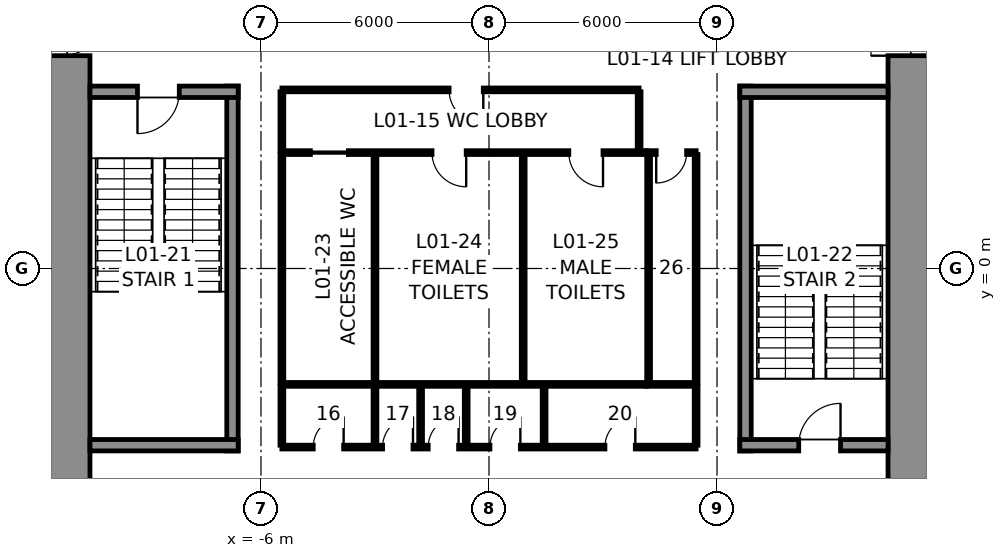
"""IFC4 building model, lengths in metres.
Left out: names, types, materials, properties, quantities, classifications, styles, units other than length and angle.
Written with IfcOpenShell. Run it as: python <this file> out.ifc"""

import sys

from ifc_helpers import new_model, si_unit, direction, frame, frame_2d, origin, place, context, subcontext, project, spatial, rectangle, extrude, element, fill, save


model = new_model("IFC4")
c1 = context("Model", 3, precision=1e-05, world=origin(), true_north=direction((0.0, 1.0)))
c2 = subcontext(c1, "Body", "Model", "MODEL_VIEW")
j1 = project(units=[si_unit("LENGTHUNIT", "METRE"), si_unit("PLANEANGLEUNIT", "RADIAN")], contexts=[c1])
p1 = place(None, origin())
s1 = spatial("IfcSite", under=j1, at=p1, CompositionType="ELEMENT")
p2 = place(p1, origin())
s2 = spatial("IfcBuilding", under=s1, at=p2, CompositionType="ELEMENT")
p3 = place(p2, frame((0.0, 0.0, 6.0)))
s3 = spatial("IfcBuildingStorey", under=s2, at=p3, CompositionType="ELEMENT", Elevation=6.0)
p4 = place(p3, frame((11.25, 10.5, 0.0), z_axis=(0.0, 0.0, 1.0), x_axis=(0.0, -1.0, 0.0)))
e1 = element("IfcWall", 1, at=p4, inside=s3, PredefinedType="SHEAR", context=c2, shape_type="SweptSolid", body=[
    extrude(rectangle(XDim=21.0, YDim=1.5, at=frame_2d((10.5, 0.0))), origin(), (0.0, 0.0, 1.0), 5.0),
])
p5 = place(p4, frame((3.7, 0.0, 0.0)))
e2 = element("IfcOpeningElement", 2, at=p5, cuts=e1, PredefinedType="OPENING", context=c2, shape_type="SweptSolid", body=[
    extrude(rectangle(XDim=1.2, YDim=2.3, at=frame_2d((0.6, 1.15))), frame((0.0, 0.76, 0.0), z_axis=(0.0, -1.0, 0.0), x_axis=(1.0, 0.0, 0.0)), (0.0, 0.0, 1.0), 1.52),
])
p6 = place(p4, frame((16.1, 0.0, 0.0)))
e3 = element("IfcOpeningElement", 3, at=p6, cuts=e1, PredefinedType="OPENING", context=c2, shape_type="SweptSolid", body=[
    extrude(rectangle(XDim=1.2, YDim=2.3, at=frame_2d((0.6, 1.15))), frame((0.0, 0.76, 0.0), z_axis=(0.0, -1.0, 0.0), x_axis=(1.0, 0.0, 0.0)), (0.0, 0.0, 1.0), 1.52),
])
p7 = place(p3, frame((-11.25, -10.5, 0.0), z_axis=(0.0, 0.0, 1.0), x_axis=(0.0, 1.0, 0.0)))
e4 = element("IfcWall", 4, at=p7, inside=s3, PredefinedType="SHEAR", context=c2, shape_type="SweptSolid", body=[
    extrude(rectangle(XDim=21.0, YDim=1.5, at=frame_2d((10.5, 0.0))), origin(), (0.0, 0.0, 1.0), 5.0),
])
p8 = place(p7, frame((16.1, 0.0, 0.0)))
e5 = element("IfcOpeningElement", 5, at=p8, cuts=e4, PredefinedType="OPENING", context=c2, shape_type="SweptSolid", body=[
    extrude(rectangle(XDim=1.2, YDim=2.3, at=frame_2d((0.6, 1.15))), frame((0.0, 0.76, 0.0), z_axis=(0.0, -1.0, 0.0), x_axis=(1.0, 0.0, 0.0)), (0.0, 0.0, 1.0), 1.52),
])
p9 = place(p7, frame((3.7, 0.0, 0.0)))
e6 = element("IfcOpeningElement", 6, at=p9, cuts=e4, PredefinedType="OPENING", context=c2, shape_type="SweptSolid", body=[
    extrude(rectangle(XDim=1.2, YDim=2.3, at=frame_2d((0.6, 1.15))), frame((0.0, 0.76, 0.0), z_axis=(0.0, -1.0, 0.0), x_axis=(1.0, 0.0, 0.0)), (0.0, 0.0, 1.0), 1.52),
])
p10 = place(p3, frame((-6.75, -4.8, 0.0), z_axis=(0.0, 0.0, 1.0), x_axis=(0.0, 1.0, 0.0)))
e7 = element("IfcWall", 7, at=p10, inside=s3, PredefinedType="SOLIDWALL", context=c2, shape_type="SweptSolid", body=[
    extrude(rectangle(XDim=9.6, YDim=0.3, at=frame_2d((4.8, 0.0))), origin(), (0.0, 0.0, 1.0), 4.75),
])
p11 = place(p3, frame((-10.5, 4.65, 0.0), z_axis=(0.0, 0.0, 1.0), x_axis=(1.0, 0.0, 0.0)))
e8 = element("IfcWall", 8, at=p11, inside=s3, PredefinedType="SOLIDWALL", context=c2, shape_type="SweptSolid", body=[
    extrude(rectangle(XDim=3.9, YDim=0.3, at=frame_2d((1.95, 0.0))), origin(), (0.0, 0.0, 1.0), 4.75),
])
p12 = place(p11, frame((1.25, 0.0, 0.0)))
e9 = element("IfcOpeningElement", 9, at=p12, cuts=e8, PredefinedType="OPENING", context=c2, shape_type="SweptSolid", body=[
    extrude(rectangle(XDim=1.1, YDim=2.3, at=frame_2d((0.55, 1.15))), frame((0.0, 0.16, 0.0), z_axis=(0.0, -1.0, 0.0), x_axis=(1.0, 0.0, 0.0)), (0.0, 0.0, 1.0), 0.32),
])
p13 = place(p3, frame((-6.6, -4.65, 0.0), z_axis=(0.0, 0.0, 1.0), x_axis=(-1.0, 0.0, 0.0)))
e10 = element("IfcWall", 10, at=p13, inside=s3, PredefinedType="SOLIDWALL", context=c2, shape_type="SweptSolid", body=[
    extrude(rectangle(XDim=3.9, YDim=0.3, at=frame_2d((1.95, 0.0))), origin(), (0.0, 0.0, 1.0), 4.75),
])
p14 = place(p3, frame((6.75, -4.8, 0.0), z_axis=(0.0, 0.0, 1.0), x_axis=(0.0, 1.0, 0.0)))
e11 = element("IfcWall", 11, at=p14, inside=s3, PredefinedType="SOLIDWALL", context=c2, shape_type="SweptSolid", body=[
    extrude(rectangle(XDim=9.6, YDim=0.3, at=frame_2d((4.8, 0.0))), origin(), (0.0, 0.0, 1.0), 4.75),
])
p15 = place(p3, frame((6.6, 4.65, 0.0), z_axis=(0.0, 0.0, 1.0), x_axis=(1.0, 0.0, 0.0)))
e12 = element("IfcWall", 12, at=p15, inside=s3, PredefinedType="SOLIDWALL", context=c2, shape_type="SweptSolid", body=[
    extrude(rectangle(XDim=3.9, YDim=0.3, at=frame_2d((1.95, 0.0))), origin(), (0.0, 0.0, 1.0), 4.75),
])
p16 = place(p3, frame((10.5, -4.65, 0.0), z_axis=(0.0, 0.0, 1.0), x_axis=(-1.0, 0.0, 0.0)))
e13 = element("IfcWall", 13, at=p16, inside=s3, PredefinedType="SOLIDWALL", context=c2, shape_type="SweptSolid", body=[
    extrude(rectangle(XDim=3.9, YDim=0.3, at=frame_2d((1.95, 0.0))), origin(), (0.0, 0.0, 1.0), 4.75),
])
p17 = place(p16, frame((1.25, 0.0, 0.0)))
e14 = element("IfcOpeningElement", 14, at=p17, cuts=e13, PredefinedType="OPENING", context=c2, shape_type="SweptSolid", body=[
    extrude(rectangle(XDim=1.1, YDim=2.3, at=frame_2d((0.55, 1.15))), frame((0.0, 0.16, 0.0), z_axis=(0.0, -1.0, 0.0), x_axis=(1.0, 0.0, 0.0)), (0.0, 0.0, 1.0), 0.32),
])
p18 = place(p3, frame((-5.45, 3.05, 0.0), z_axis=(0.0, 0.0, 1.0), x_axis=(1.0, 0.0, 0.0)))
e15 = element("IfcWall", 15, at=p18, inside=s3, PredefinedType="PARTITIONING", context=c2, shape_type="SweptSolid", body=[
    extrude(rectangle(XDim=9.6, YDim=0.1, at=frame_2d((4.8, 0.0))), origin(), (0.0, 0.0, 1.0), 4.75),
])
p19 = place(p18, frame((0.75, 0.0, 0.0)))
e16 = element("IfcOpeningElement", 16, at=p19, cuts=e15, PredefinedType="OPENING", context=c2, shape_type="SweptSolid", body=[
    extrude(rectangle(XDim=1.0, YDim=2.3, at=frame_2d((0.5, 1.15))), frame((0.0, 0.06, 0.0), z_axis=(0.0, -1.0, 0.0), x_axis=(1.0, 0.0, 0.0)), (0.0, 0.0, 1.0), 0.12),
])
p20 = place(p18, frame((3.95, 0.0, 0.0)))
e17 = element("IfcOpeningElement", 17, at=p20, cuts=e15, PredefinedType="OPENING", context=c2, shape_type="SweptSolid", body=[
    extrude(rectangle(XDim=0.9, YDim=2.3, at=frame_2d((0.45, 1.15))), frame((0.0, 0.06, 0.0), z_axis=(0.0, -1.0, 0.0), x_axis=(1.0, 0.0, 0.0)), (0.0, 0.0, 1.0), 0.12),
])
p21 = place(p18, frame((7.55, 0.0, 0.0)))
e18 = element("IfcOpeningElement", 18, at=p21, cuts=e15, PredefinedType="OPENING", context=c2, shape_type="SweptSolid", body=[
    extrude(rectangle(XDim=0.9, YDim=2.3, at=frame_2d((0.45, 1.15))), frame((0.0, 0.06, 0.0), z_axis=(0.0, -1.0, 0.0), x_axis=(1.0, 0.0, 0.0)), (0.0, 0.0, 1.0), 0.12),
])
p22 = place(p3, frame((4.15, 3.05, 0.0), z_axis=(0.0, 0.0, 1.0), x_axis=(1.0, 0.0, 0.0)))
e19 = element("IfcWall", 19, at=p22, inside=s3, PredefinedType="PARTITIONING", context=c2, shape_type="SweptSolid", body=[
    extrude(rectangle(XDim=1.3, YDim=0.1, at=frame_2d((0.65, 0.0))), origin(), (0.0, 0.0, 1.0), 4.75),
])
p23 = place(p22, frame((0.25, 0.0, 0.0)))
e20 = element("IfcOpeningElement", 20, at=p23, cuts=e19, PredefinedType="OPENING", context=c2, shape_type="SweptSolid", body=[
    extrude(rectangle(XDim=0.8, YDim=2.3, at=frame_2d((0.4, 1.15))), frame((0.0, 0.06, 0.0), z_axis=(0.0, -1.0, 0.0), x_axis=(1.0, 0.0, 0.0)), (0.0, 0.0, 1.0), 0.12),
])
p24 = place(p3, frame((4.15, -3.05, 0.0), z_axis=(0.0, 0.0, 1.0), x_axis=(-1.0, 0.0, 0.0)))
e21 = element("IfcWall", 21, at=p24, inside=s3, PredefinedType="PARTITIONING", context=c2, shape_type="SweptSolid", body=[
    extrude(rectangle(XDim=9.6, YDim=0.1, at=frame_2d((4.8, 0.0))), origin(), (0.0, 0.0, 1.0), 4.75),
])
p25 = place(p3, frame((5.45, -3.05, 0.0), z_axis=(0.0, 0.0, 1.0), x_axis=(-1.0, 0.0, 0.0)))
e22 = element("IfcWall", 22, at=p25, inside=s3, PredefinedType="PARTITIONING", context=c2, shape_type="SweptSolid", body=[
    extrude(rectangle(XDim=1.3, YDim=0.1, at=frame_2d((0.65, 0.0))), origin(), (0.0, 0.0, 1.0), 4.75),
])
for number, where, z_axis, x_axis in (
    (23, (5.45, 3.0, 0.0), (0.0, 0.0, 1.0), (0.0, -1.0, 0.0)),
    (24, (-5.45, -3.0, 0.0), (0.0, 0.0, 1.0), (0.0, 1.0, 0.0)),
    (25, (-3.0, -3.0, 0.0), (0.0, 0.0, 1.0), (0.0, 1.0, 0.0)),
    (26, (0.9, -3.0, 0.0), (0.0, 0.0, 1.0), (0.0, 1.0, 0.0)),
    (27, (4.2, -3.0, 0.0), (0.0, 0.0, 1.0), (0.0, 1.0, 0.0)),
):
    element("IfcWall", number, at=place(p3, frame(where, z_axis=z_axis, x_axis=x_axis)), inside=s3, PredefinedType="PARTITIONING", context=c2, shape_type="SweptSolid", body=[
        extrude(rectangle(XDim=6.0, YDim=0.1, at=frame_2d((3.0, 0.0))), origin(), (0.0, 0.0, 1.0), 4.75),
    ])
p26 = place(p3, frame((-5.45, 4.7, 0.0), z_axis=(0.0, 0.0, 1.0), x_axis=(1.0, 0.0, 0.0)))
e28 = element("IfcWall", 28, at=p26, inside=s3, PredefinedType="PARTITIONING", context=c2, shape_type="SweptSolid", body=[
    extrude(rectangle(XDim=9.4, YDim=0.1, at=frame_2d((4.7, 0.0))), origin(), (0.0, 0.0, 1.0), 4.75),
])
p27 = place(p26, frame((4.4, 0.0, 0.0)))
e29 = element("IfcOpeningElement", 29, at=p27, cuts=e28, PredefinedType="OPENING", context=c2, shape_type="SweptSolid", body=[
    extrude(rectangle(XDim=0.9, YDim=2.3, at=frame_2d((0.45, 1.15))), frame((0.0, 0.06, 0.0), z_axis=(0.0, -1.0, 0.0), x_axis=(1.0, 0.0, 0.0)), (0.0, 0.0, 1.0), 0.12),
])
for number, where, z_axis, x_axis in (
    (30, (-5.45, 3.1, 0.0), (0.0, 0.0, 1.0), (0.0, 1.0, 0.0)),
    (31, (3.95, 3.1, 0.0), (0.0, 0.0, 1.0), (0.0, 1.0, 0.0)),
):
    element("IfcWall", number, at=place(p3, frame(where, z_axis=z_axis, x_axis=x_axis)), inside=s3, PredefinedType="PARTITIONING", context=c2, shape_type="SweptSolid", body=[
        extrude(rectangle(XDim=1.55, YDim=0.1, at=frame_2d((0.775, 0.0))), origin(), (0.0, 0.0, 1.0), 4.75),
    ])
p28 = place(p3, frame((5.45, -4.7, 0.0), z_axis=(0.0, 0.0, 1.0), x_axis=(-1.0, 0.0, 0.0)))
e32 = element("IfcWall", 32, at=p28, inside=s3, PredefinedType="PARTITIONING", context=c2, shape_type="SweptSolid", body=[
    extrude(rectangle(XDim=10.9, YDim=0.1, at=frame_2d((5.45, 0.0))), origin(), (0.0, 0.0, 1.0), 4.75),
])
p29 = place(p28, frame((9.275, 0.0, 0.0)))
e33 = element("IfcOpeningElement", 33, at=p29, cuts=e32, PredefinedType="OPENING", context=c2, shape_type="SweptSolid", body=[
    extrude(rectangle(XDim=0.8, YDim=2.3, at=frame_2d((0.4, 1.15))), frame((0.0, 0.06, 0.0), z_axis=(0.0, -1.0, 0.0), x_axis=(1.0, 0.0, 0.0)), (0.0, 0.0, 1.0), 0.12),
])
p30 = place(p28, frame((7.45, 0.0, 0.0)))
e34 = element("IfcOpeningElement", 34, at=p30, cuts=e32, PredefinedType="OPENING", context=c2, shape_type="SweptSolid", body=[
    extrude(rectangle(XDim=0.8, YDim=2.3, at=frame_2d((0.4, 1.15))), frame((0.0, 0.06, 0.0), z_axis=(0.0, -1.0, 0.0), x_axis=(1.0, 0.0, 0.0)), (0.0, 0.0, 1.0), 0.12),
])
p31 = place(p28, frame((6.25, 0.0, 0.0)))
e35 = element("IfcOpeningElement", 35, at=p31, cuts=e32, PredefinedType="OPENING", context=c2, shape_type="SweptSolid", body=[
    extrude(rectangle(XDim=0.8, YDim=2.3, at=frame_2d((0.4, 1.15))), frame((0.0, 0.06, 0.0), z_axis=(0.0, -1.0, 0.0), x_axis=(1.0, 0.0, 0.0)), (0.0, 0.0, 1.0), 0.12),
])
p32 = place(p28, frame((4.625, 0.0, 0.0)))
e36 = element("IfcOpeningElement", 36, at=p32, cuts=e32, PredefinedType="OPENING", context=c2, shape_type="SweptSolid", body=[
    extrude(rectangle(XDim=0.8, YDim=2.3, at=frame_2d((0.4, 1.15))), frame((0.0, 0.06, 0.0), z_axis=(0.0, -1.0, 0.0), x_axis=(1.0, 0.0, 0.0)), (0.0, 0.0, 1.0), 0.12),
])
p33 = place(p28, frame((1.6, 0.0, 0.0)))
e37 = element("IfcOpeningElement", 37, at=p33, cuts=e32, PredefinedType="OPENING", context=c2, shape_type="SweptSolid", body=[
    extrude(rectangle(XDim=0.8, YDim=2.3, at=frame_2d((0.4, 1.15))), frame((0.0, 0.06, 0.0), z_axis=(0.0, -1.0, 0.0), x_axis=(1.0, 0.0, 0.0)), (0.0, 0.0, 1.0), 0.12),
])
for number, where, z_axis, x_axis in (
    (38, (-5.45, -3.1, 0.0), (0.0, 0.0, 1.0), (0.0, -1.0, 0.0)),
    (39, (5.45, -3.1, 0.0), (0.0, 0.0, 1.0), (0.0, -1.0, 0.0)),
    (40, (-3.0, -3.1, 0.0), (0.0, 0.0, 1.0), (0.0, -1.0, 0.0)),
    (41, (-1.8, -3.1, 0.0), (0.0, 0.0, 1.0), (0.0, -1.0, 0.0)),
    (42, (-0.6, -3.1, 0.0), (0.0, 0.0, 1.0), (0.0, -1.0, 0.0)),
    (43, (1.45, -3.1, 0.0), (0.0, 0.0, 1.0), (0.0, -1.0, 0.0)),
):
    element("IfcWall", number, at=place(p3, frame(where, z_axis=z_axis, x_axis=x_axis)), inside=s3, PredefinedType="PARTITIONING", context=c2, shape_type="SweptSolid", body=[
        extrude(rectangle(XDim=1.55, YDim=0.1, at=frame_2d((0.775, 0.0))), origin(), (0.0, 0.0, 1.0), 4.75),
    ])
p34 = place(p12, frame((1.1, 0.0, 0.0), z_axis=(0.0, 0.0, 1.0), x_axis=(-1.0, 0.0, 0.0)))
e44 = element("IfcDoor", 44, at=p34, inside=s3, OperationType="SINGLE_SWING_RIGHT", PredefinedType="DOOR", context=c2, shape_type="SweptSolid", body=[
    extrude(rectangle(XDim=1.1, YDim=2.3, at=frame_2d((0.55, 1.15))), frame((0.0, 0.025, 0.0), z_axis=(0.0, -1.0, 0.0), x_axis=(1.0, 0.0, 0.0)), (0.0, 0.0, 1.0), 0.05),
])
fill(e9, e44)
p35 = place(p17, frame((1.1, 0.0, 0.0), z_axis=(0.0, 0.0, 1.0), x_axis=(-1.0, 0.0, 0.0)))
e45 = element("IfcDoor", 45, at=p35, inside=s3, OperationType="SINGLE_SWING_RIGHT", PredefinedType="DOOR", context=c2, shape_type="SweptSolid", body=[
    extrude(rectangle(XDim=1.1, YDim=2.3, at=frame_2d((0.55, 1.15))), frame((0.0, 0.025, 0.0), z_axis=(0.0, -1.0, 0.0), x_axis=(1.0, 0.0, 0.0)), (0.0, 0.0, 1.0), 0.05),
])
fill(e14, e45)
p36 = place(p19, frame((1.0, 0.0, 0.0), z_axis=(0.0, 0.0, 1.0), x_axis=(-1.0, 0.0, 0.0)))
e46 = element("IfcDoor", 46, at=p36, inside=s3, OperationType="SLIDING_TO_LEFT", PredefinedType="DOOR", context=c2, shape_type="SweptSolid", body=[
    extrude(rectangle(XDim=1.0, YDim=2.3, at=frame_2d((0.5, 1.15))), frame((0.0, 0.025, 0.0), z_axis=(0.0, -1.0, 0.0), x_axis=(1.0, 0.0, 0.0)), (0.0, 0.0, 1.0), 0.05),
])
fill(e16, e46)
p37 = place(p20, frame((0.9, 0.0, 0.0), z_axis=(0.0, 0.0, 1.0), x_axis=(-1.0, 0.0, 0.0)))
e47 = element("IfcDoor", 47, at=p37, inside=s3, OperationType="SINGLE_SWING_LEFT", PredefinedType="DOOR", context=c2, shape_type="SweptSolid", body=[
    extrude(rectangle(XDim=0.9, YDim=2.3, at=frame_2d((0.45, 1.15))), frame((0.0, 0.025, 0.0), z_axis=(0.0, -1.0, 0.0), x_axis=(1.0, 0.0, 0.0)), (0.0, 0.0, 1.0), 0.05),
])
fill(e17, e47)
p38 = place(p21, frame((0.9, 0.0, 0.0), z_axis=(0.0, 0.0, 1.0), x_axis=(-1.0, 0.0, 0.0)))
e48 = element("IfcDoor", 48, at=p38, inside=s3, OperationType="SINGLE_SWING_LEFT", PredefinedType="DOOR", context=c2, shape_type="SweptSolid", body=[
    extrude(rectangle(XDim=0.9, YDim=2.3, at=frame_2d((0.45, 1.15))), frame((0.0, 0.025, 0.0), z_axis=(0.0, -1.0, 0.0), x_axis=(1.0, 0.0, 0.0)), (0.0, 0.0, 1.0), 0.05),
])
fill(e18, e48)
p39 = place(p23, frame((0.8, 0.0, 0.0), z_axis=(0.0, 0.0, 1.0), x_axis=(-1.0, 0.0, 0.0)))
e49 = element("IfcDoor", 49, at=p39, inside=s3, OperationType="SINGLE_SWING_RIGHT", PredefinedType="DOOR", context=c2, shape_type="SweptSolid", body=[
    extrude(rectangle(XDim=0.8, YDim=2.3, at=frame_2d((0.4, 1.15))), frame((0.0, 0.025, 0.0), z_axis=(0.0, -1.0, 0.0), x_axis=(1.0, 0.0, 0.0)), (0.0, 0.0, 1.0), 0.05),
])
fill(e20, e49)
p40 = place(p27, frame((0.9, 0.0, 0.0), z_axis=(0.0, 0.0, 1.0), x_axis=(-1.0, 0.0, 0.0)))
e50 = element("IfcDoor", 50, at=p40, inside=s3, OperationType="SINGLE_SWING_LEFT", PredefinedType="DOOR", context=c2, shape_type="SweptSolid", body=[
    extrude(rectangle(XDim=0.9, YDim=2.3, at=frame_2d((0.45, 1.15))), frame((0.0, 0.025, 0.0), z_axis=(0.0, -1.0, 0.0), x_axis=(1.0, 0.0, 0.0)), (0.0, 0.0, 1.0), 0.05),
])
fill(e29, e50)
p41 = place(p29, frame((0.8, 0.0, 0.0), z_axis=(0.0, 0.0, 1.0), x_axis=(-1.0, 0.0, 0.0)))
e51 = element("IfcDoor", 51, at=p41, inside=s3, OperationType="SINGLE_SWING_RIGHT", PredefinedType="DOOR", context=c2, shape_type="SweptSolid", body=[
    extrude(rectangle(XDim=0.8, YDim=2.3, at=frame_2d((0.4, 1.15))), frame((0.0, 0.025, 0.0), z_axis=(0.0, -1.0, 0.0), x_axis=(1.0, 0.0, 0.0)), (0.0, 0.0, 1.0), 0.05),
])
fill(e33, e51)
p42 = place(p30, frame((0.8, 0.0, 0.0), z_axis=(0.0, 0.0, 1.0), x_axis=(-1.0, 0.0, 0.0)))
e52 = element("IfcDoor", 52, at=p42, inside=s3, OperationType="SINGLE_SWING_RIGHT", PredefinedType="DOOR", context=c2, shape_type="SweptSolid", body=[
    extrude(rectangle(XDim=0.8, YDim=2.3, at=frame_2d((0.4, 1.15))), frame((0.0, 0.025, 0.0), z_axis=(0.0, -1.0, 0.0), x_axis=(1.0, 0.0, 0.0)), (0.0, 0.0, 1.0), 0.05),
])
fill(e34, e52)
p43 = place(p31, frame((0.8, 0.0, 0.0), z_axis=(0.0, 0.0, 1.0), x_axis=(-1.0, 0.0, 0.0)))
e53 = element("IfcDoor", 53, at=p43, inside=s3, OperationType="SINGLE_SWING_RIGHT", PredefinedType="DOOR", context=c2, shape_type="SweptSolid", body=[
    extrude(rectangle(XDim=0.8, YDim=2.3, at=frame_2d((0.4, 1.15))), frame((0.0, 0.025, 0.0), z_axis=(0.0, -1.0, 0.0), x_axis=(1.0, 0.0, 0.0)), (0.0, 0.0, 1.0), 0.05),
])
fill(e35, e53)
p44 = place(p32, frame((0.8, 0.0, 0.0), z_axis=(0.0, 0.0, 1.0), x_axis=(-1.0, 0.0, 0.0)))
e54 = element("IfcDoor", 54, at=p44, inside=s3, OperationType="SINGLE_SWING_RIGHT", PredefinedType="DOOR", context=c2, shape_type="SweptSolid", body=[
    extrude(rectangle(XDim=0.8, YDim=2.3, at=frame_2d((0.4, 1.15))), frame((0.0, 0.025, 0.0), z_axis=(0.0, -1.0, 0.0), x_axis=(1.0, 0.0, 0.0)), (0.0, 0.0, 1.0), 0.05),
])
fill(e36, e54)
p45 = place(p33, frame((0.8, 0.0, 0.0), z_axis=(0.0, 0.0, 1.0), x_axis=(-1.0, 0.0, 0.0)))
e55 = element("IfcDoor", 55, at=p45, inside=s3, OperationType="SINGLE_SWING_RIGHT", PredefinedType="DOOR", context=c2, shape_type="SweptSolid", body=[
    extrude(rectangle(XDim=0.8, YDim=2.3, at=frame_2d((0.4, 1.15))), frame((0.0, 0.025, 0.0), z_axis=(0.0, -1.0, 0.0), x_axis=(1.0, 0.0, 0.0)), (0.0, 0.0, 1.0), 0.05),
])
fill(e37, e55)
p46 = place(p8, frame((1.2, 0.0, 0.0), z_axis=(0.0, 0.0, 1.0), x_axis=(-1.0, 0.0, 0.0)))
e56 = element("IfcDoor", 56, at=p46, inside=s3, OperationType="SINGLE_SWING_LEFT", PredefinedType="DOOR", context=c2, shape_type="SweptSolid", body=[
    extrude(rectangle(XDim=1.2, YDim=2.3, at=frame_2d((0.6, 1.15))), frame((0.0, 0.025, 0.0), z_axis=(0.0, -1.0, 0.0), x_axis=(1.0, 0.0, 0.0)), (0.0, 0.0, 1.0), 0.05),
])
fill(e5, e56)
p47 = place(p5, frame((1.2, 0.0, 0.0), z_axis=(0.0, 0.0, 1.0), x_axis=(-1.0, 0.0, 0.0)))
e57 = element("IfcDoor", 57, at=p47, inside=s3, OperationType="SINGLE_SWING_LEFT", PredefinedType="DOOR", context=c2, shape_type="SweptSolid", body=[
    extrude(rectangle(XDim=1.2, YDim=2.3, at=frame_2d((0.6, 1.15))), frame((0.0, 0.025, 0.0), z_axis=(0.0, -1.0, 0.0), x_axis=(1.0, 0.0, 0.0)), (0.0, 0.0, 1.0), 0.05),
])
fill(e2, e57)
save(model, sys.argv[1])
